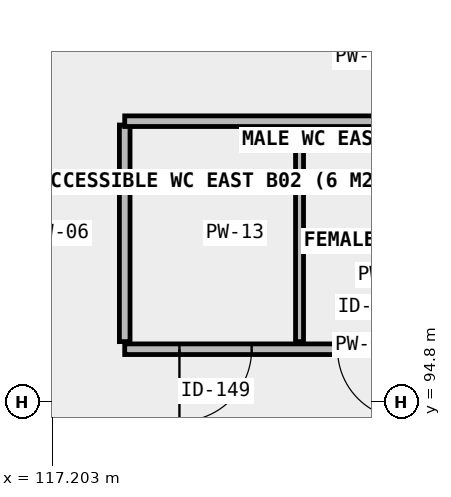
"""IFC4 building model, lengths in metres.
Left out: names, types, materials, properties, quantities, classifications, styles, units other than length and angle.
Written with IfcOpenShell. Run it as: python <this file> out.ifc"""

import sys

from ifc_helpers import new_model, si_unit, direction, frame, frame_2d, origin, place, context, subcontext, project, spatial, rectangle, extrude, element, fill, save


model = new_model("IFC4")
c1 = context("Model", 3, precision=1e-05, world=origin(), true_north=direction((0.0, 1.0)))
c2 = subcontext(c1, "Body", "Model", "MODEL_VIEW")
j1 = project(units=[si_unit("LENGTHUNIT", "METRE"), si_unit("PLANEANGLEUNIT", "RADIAN")], contexts=[c1])
p1 = place(None, origin())
s1 = spatial("IfcSite", under=j1, at=p1, CompositionType="ELEMENT")
p2 = place(p1, origin())
s2 = spatial("IfcBuilding", under=s1, at=p2, CompositionType="ELEMENT")
p3 = place(p2, frame((0.0, 0.0, -8.4)))
s3 = spatial("IfcBuildingStorey", under=s2, at=p3, CompositionType="ELEMENT", Elevation=-8.4)
p4 = place(p3, frame((118.15, 95.5, 0.0), z_axis=(0.0, 0.0, 1.0), x_axis=(1.0, 0.0, 0.0)))
e1 = element("IfcWall", 1, at=p4, inside=s3, PredefinedType="PLUMBINGWALL", context=c2, shape_type="SweptSolid", body=[
    extrude(rectangle(XDim=6.3, YDim=0.14, at=frame_2d((3.15, 0.0))), origin(), (0.0, 0.0, 1.0), 3.9),
])
p5 = place(p4, frame((0.72, 0.0, 0.0)))
e2 = element("IfcOpeningElement", 2, at=p5, cuts=e1, PredefinedType="OPENING", context=c2, shape_type="SweptSolid", body=[
    extrude(rectangle(XDim=0.95, YDim=2.1, at=frame_2d((0.475, 1.05))), frame((0.0, 0.08, 0.0), z_axis=(0.0, -1.0, 0.0), x_axis=(1.0, 0.0, 0.0)), (0.0, 0.0, 1.0), 0.16),
])
p6 = place(p4, frame((2.8, 0.0, 0.0)))
e3 = element("IfcOpeningElement", 3, at=p6, cuts=e1, PredefinedType="OPENING", context=c2, shape_type="SweptSolid", body=[
    extrude(rectangle(XDim=0.92, YDim=2.1, at=frame_2d((0.46, 1.05))), frame((0.0, 0.08, 0.0), z_axis=(0.0, -1.0, 0.0), x_axis=(1.0, 0.0, 0.0)), (0.0, 0.0, 1.0), 0.16),
])
p7 = place(p4, frame((4.8, 0.0, 0.0)))
e4 = element("IfcOpeningElement", 4, at=p7, cuts=e1, PredefinedType="OPENING", context=c2, shape_type="SweptSolid", body=[
    extrude(rectangle(XDim=0.92, YDim=2.1, at=frame_2d((0.46, 1.05))), frame((0.0, 0.08, 0.0), z_axis=(0.0, -1.0, 0.0), x_axis=(1.0, 0.0, 0.0)), (0.0, 0.0, 1.0), 0.16),
])
p8 = place(p3, frame((118.15, 95.6, 0.0), z_axis=(0.0, 0.0, 1.0), x_axis=(0.0, 1.0, 0.0)))
e5 = element("IfcWall", 5, at=p8, inside=s3, PredefinedType="PLUMBINGWALL", context=c2, shape_type="SweptSolid", body=[
    extrude(rectangle(XDim=2.85, YDim=0.14, at=frame_2d((1.425, 0.0))), origin(), (0.0, 0.0, 1.0), 3.9),
])
p9 = place(p3, frame((120.45, 95.6, 0.0), z_axis=(0.0, 0.0, 1.0), x_axis=(0.0, 1.0, 0.0)))
e6 = element("IfcWall", 6, at=p9, inside=s3, PredefinedType="PARTITIONING", context=c2, shape_type="SweptSolid", body=[
    extrude(rectangle(XDim=2.85, YDim=0.105, at=frame_2d((1.425, 0.0))), origin(), (0.0, 0.0, 1.0), 3.9),
])
p10 = place(p3, frame((118.15, 98.5, 0.0), z_axis=(0.0, 0.0, 1.0), x_axis=(1.0, 0.0, 0.0)))
e7 = element("IfcWall", 7, at=p10, inside=s3, PredefinedType="PLUMBINGWALL", context=c2, shape_type="SweptSolid", body=[
    extrude(rectangle(XDim=6.3, YDim=0.14, at=frame_2d((3.15, 0.0))), origin(), (0.0, 0.0, 1.0), 3.9),
])
p11 = place(p5, frame((0.475, 0.0, 0.0), z_axis=(0.0, 0.0, 1.0), x_axis=(-1.0, 0.0, 0.0)))
e8 = element("IfcDoor", 8, at=p11, inside=s3, OperationType="SINGLE_SWING_LEFT", PredefinedType="DOOR", context=c2, shape_type="SweptSolid", body=[
    extrude(rectangle(XDim=0.95, YDim=2.1, at=frame_2d((0.0, 1.05))), frame((0.0, 0.025, 0.0), z_axis=(0.0, -1.0, 0.0), x_axis=(1.0, 0.0, 0.0)), (0.0, 0.0, 1.0), 0.05),
])
fill(e2, e8)
p12 = place(p6, origin())
e9 = element("IfcDoor", 9, at=p12, inside=s3, OperationType="SINGLE_SWING_RIGHT", PredefinedType="DOOR", context=c2, shape_type="SweptSolid", body=[
    extrude(rectangle(XDim=0.92, YDim=2.1, at=frame_2d((0.46, 1.05))), frame((0.0, 0.025, 0.0), z_axis=(0.0, -1.0, 0.0), x_axis=(1.0, 0.0, 0.0)), (0.0, 0.0, 1.0), 0.05),
])
fill(e3, e9)
save(model, sys.argv[1])
